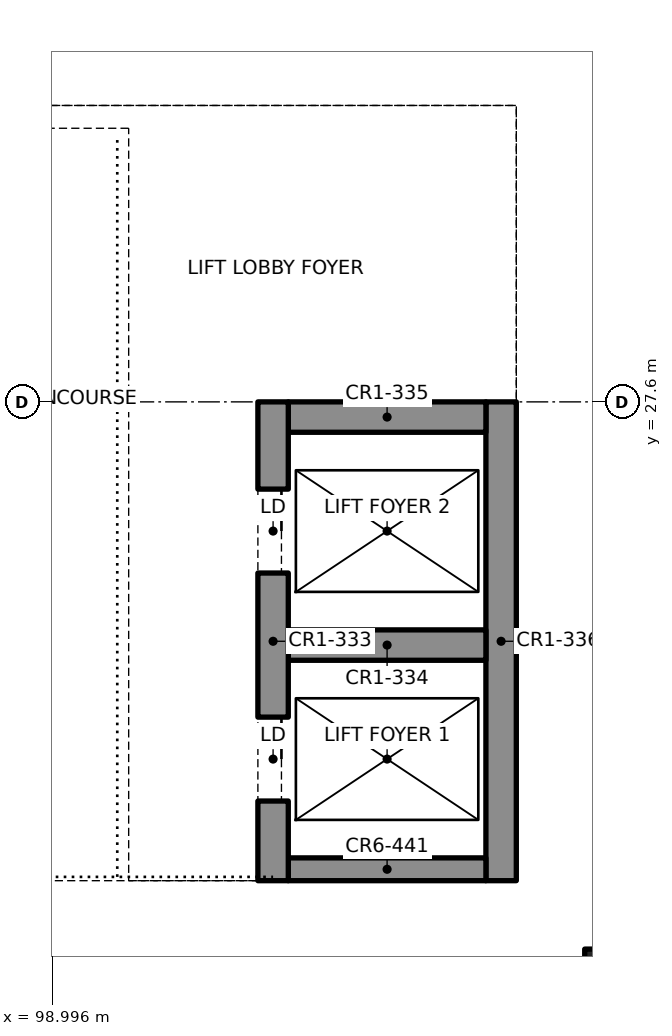
"""IFC4 building model, lengths in metres.
Left out: names, types, materials, properties, quantities, classifications, styles, units other than length and angle.
Written with IfcOpenShell. Run it as: python <this file> out.ifc"""

import sys

from ifc_helpers import new_model, si_unit, direction, frame, frame_2d, origin, origin_2d, place, context, subcontext, project, spatial, rectangle, extrude, element, fill, save


model = new_model("IFC4")
c1 = context("Model", 3, precision=1e-05, world=origin(), true_north=direction((0.0, 1.0)))
c2 = subcontext(c1, "Body", "Model", "MODEL_VIEW")
j1 = project(units=[si_unit("LENGTHUNIT", "METRE"), si_unit("PLANEANGLEUNIT", "RADIAN")], contexts=[c1])
p1 = place(None, origin())
s1 = spatial("IfcSite", under=j1, at=p1, CompositionType="ELEMENT")
p2 = place(p1, origin())
s2 = spatial("IfcBuilding", under=s1, at=p2, CompositionType="ELEMENT")
p3 = place(p2, frame((0.0, 0.0, 4.4)))
s3 = spatial("IfcBuildingStorey", under=s2, at=p3, CompositionType="ELEMENT", Elevation=4.4)
p4 = place(p3, frame((107.2, 19.2, 0.0), z_axis=(0.0, 0.0, 1.0), x_axis=(1.0, 0.0, 0.0)))
e1 = element("IfcColumn", 1, at=p4, inside=s3, PredefinedType="COLUMN", context=c2, shape_type="SweptSolid", body=[
    extrude(rectangle(XDim=2.4, YDim=2.4, at=origin_2d()), origin(), (0.0, 0.0, 1.0), 4.4),
])
p5 = place(p3, frame((101.9, 21.3, 0.0), z_axis=(0.0, 0.0, 1.0), x_axis=(0.0, 1.0, 0.0)))
e2 = element("IfcWall", 2, at=p5, inside=s3, PredefinedType="SHEAR", context=c2, shape_type="SweptSolid", body=[
    extrude(rectangle(XDim=6.3, YDim=0.4, at=frame_2d((3.15, 0.0))), origin(), (0.0, 0.0, 1.0), 4.0),
])
p6 = place(p5, frame((1.05, 0.0, 0.0)))
e3 = element("IfcOpeningElement", 3, at=p6, cuts=e2, PredefinedType="OPENING", context=c2, shape_type="SweptSolid", body=[
    extrude(rectangle(XDim=1.1, YDim=2.1, at=frame_2d((0.55, 1.05))), frame((0.0, 0.21, 0.0), z_axis=(0.0, -1.0, 0.0), x_axis=(1.0, 0.0, 0.0)), (0.0, 0.0, 1.0), 0.42),
])
p7 = place(p5, frame((4.05, 0.0, 0.0)))
e4 = element("IfcOpeningElement", 4, at=p7, cuts=e2, PredefinedType="OPENING", context=c2, shape_type="SweptSolid", body=[
    extrude(rectangle(XDim=1.1, YDim=2.1, at=frame_2d((0.55, 1.05))), frame((0.0, 0.21, 0.0), z_axis=(0.0, -1.0, 0.0), x_axis=(1.0, 0.0, 0.0)), (0.0, 0.0, 1.0), 0.42),
])
p8 = place(p3, frame((104.9, 21.3, 0.0), z_axis=(0.0, 0.0, 1.0), x_axis=(0.0, 1.0, 0.0)))
e5 = element("IfcWall", 5, at=p8, inside=s3, PredefinedType="SHEAR", context=c2, shape_type="SweptSolid", body=[
    extrude(rectangle(XDim=6.3, YDim=0.4, at=frame_2d((3.15, 0.0))), origin(), (0.0, 0.0, 1.0), 4.0),
])
p9 = place(p3, frame((102.1, 21.45, 0.0), z_axis=(0.0, 0.0, 1.0), x_axis=(1.0, 0.0, 0.0)))
e6 = element("IfcWall", 6, at=p9, inside=s3, PredefinedType="SOLIDWALL", context=c2, shape_type="SweptSolid", body=[
    extrude(rectangle(XDim=2.6, YDim=0.3, at=frame_2d((1.3, 0.0))), origin(), (0.0, 0.0, 1.0), 4.0),
])
for number, where, z_axis, x_axis in (
    (7, (102.1, 24.4, 0.0), (0.0, 0.0, 1.0), (1.0, 0.0, 0.0)),
    (8, (102.1, 27.4, 0.0), (0.0, 0.0, 1.0), (1.0, 0.0, 0.0)),
):
    element("IfcWall", number, at=place(p3, frame(where, z_axis=z_axis, x_axis=x_axis)), inside=s3, PredefinedType="SHEAR", context=c2, shape_type="SweptSolid", body=[
        extrude(rectangle(XDim=2.6, YDim=0.4, at=frame_2d((1.3, 0.0))), origin(), (0.0, 0.0, 1.0), 4.0),
    ])
p10 = place(p6, origin())
e9 = element("IfcDoor", 9, at=p10, inside=s3, OperationType="SLIDING_TO_LEFT", PredefinedType="DOOR", context=c2, shape_type="SweptSolid", body=[
    extrude(rectangle(XDim=1.1, YDim=2.1, at=frame_2d((0.55, 1.05))), frame((0.0, 0.025, 0.0), z_axis=(0.0, -1.0, 0.0), x_axis=(1.0, 0.0, 0.0)), (0.0, 0.0, 1.0), 0.05),
])
fill(e3, e9)
p11 = place(p7, origin())
e10 = element("IfcDoor", 10, at=p11, inside=s3, OperationType="SLIDING_TO_LEFT", PredefinedType="DOOR", context=c2, shape_type="SweptSolid", body=[
    extrude(rectangle(XDim=1.1, YDim=2.1, at=frame_2d((0.55, 1.05))), frame((0.0, 0.025, 0.0), z_axis=(0.0, -1.0, 0.0), x_axis=(1.0, 0.0, 0.0)), (0.0, 0.0, 1.0), 0.05),
])
fill(e4, e10)
save(model, sys.argv[1])
